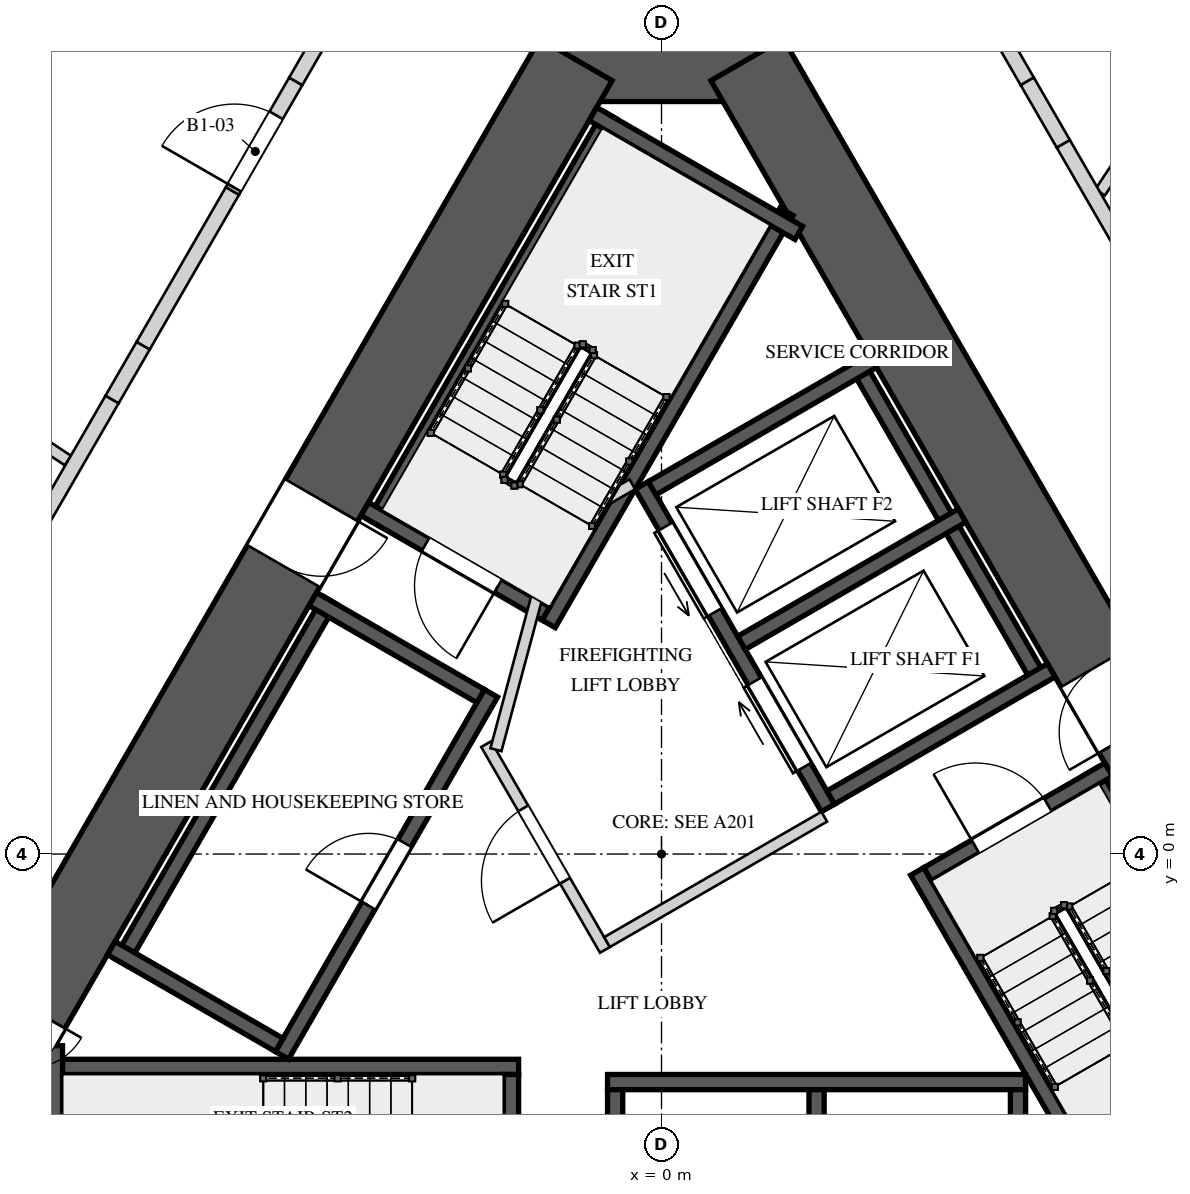
"""IFC4 building model, lengths in metres.
Left out: names, types, materials, properties, quantities, classifications, styles, units other than length and angle.
Written with IfcOpenShell. Run it as: python <this file> out.ifc"""

import sys

from ifc_helpers import new_model, si_unit, direction, frame, frame_2d, origin, place, context, subcontext, project, spatial, polyline, rectangle, outline, extrude, element, fill, save


model = new_model("IFC4")
c1 = context("Model", 3, precision=1e-05, world=origin(), true_north=direction((0.0, 1.0)))
c2 = subcontext(c1, "Body", "Model", "MODEL_VIEW")
j1 = project(units=[si_unit("LENGTHUNIT", "METRE"), si_unit("PLANEANGLEUNIT", "RADIAN")], contexts=[c1])
p1 = place(None, origin())
s1 = spatial("IfcSite", under=j1, at=p1, CompositionType="ELEMENT")
p2 = place(p1, origin())
s2 = spatial("IfcBuilding", under=s1, at=p2, CompositionType="ELEMENT")
p3 = place(p2, frame((0.0, 0.0, -5.0)))
s3 = spatial("IfcBuildingStorey", under=s2, at=p3, CompositionType="ELEMENT", Elevation=-5.0)
for number, where, z_axis, x_axis in (
    (1, (-2.454, 33.25, -0.3), (0.0, 0.0, 1.0), (-0.5, -0.866, 0.0)),
    (2, (30.022, -14.5, -0.3), (0.0, 0.0, 1.0), (-0.5, 0.866, 0.0)),
):
    element("IfcWall", number, at=place(p3, frame(where, z_axis=z_axis, x_axis=x_axis)), inside=s3, PredefinedType="SHEAR", context=c2, shape_type="SweptSolid", body=[
        extrude(rectangle(XDim=55.137, YDim=0.5, at=frame_2d((27.568, 0.0))), origin(), (0.0, 0.0, 1.0), 5.3),
    ])
p4 = place(p3, frame((1.443, 10.45, -0.3), z_axis=(0.0, 0.0, 1.0), x_axis=(-1.0, 0.0, 0.0)))
e3 = element("IfcWall", 3, at=p4, inside=s3, PredefinedType="SHEAR", context=c2, shape_type="SweptSolid", body=[
    extrude(rectangle(XDim=2.887, YDim=1.1, at=frame_2d((1.443, 0.0))), origin(), (0.0, 0.0, 1.0), 5.3),
])
p5 = place(p3, frame((-1.126, 10.45, -0.3), z_axis=(0.0, 0.0, 1.0), x_axis=(-0.500001757713, -0.866024388966, 0.0)))
e4 = element("IfcWall", 4, at=p5, inside=s3, PredefinedType="SHEAR", context=c2, shape_type="SweptSolid", body=[
    extrude(rectangle(XDim=16.974, YDim=1.1, at=frame_2d((8.487, 0.0))), origin(), (0.0, 0.0, 1.0), 5.3),
])
p6 = place(p5, frame((6.692, 0.0, 0.3)))
e5 = element("IfcOpeningElement", 5, at=p6, cuts=e4, PredefinedType="OPENING", context=c2, shape_type="SweptSolid", body=[
    extrude(rectangle(XDim=1.0, YDim=2.4, at=frame_2d((0.5, 1.2))), frame((0.0, 0.56, 0.0), z_axis=(0.0, -1.0, 0.0), x_axis=(1.0, 0.0, 0.0)), (0.0, 0.0, 1.0), 1.12),
])
p7 = place(p5, frame((14.397, 0.0, 0.3)))
e6 = element("IfcOpeningElement", 6, at=p7, cuts=e4, PredefinedType="OPENING", context=c2, shape_type="SweptSolid", body=[
    extrude(rectangle(XDim=0.8, YDim=2.1, at=frame_2d((0.4, 1.05))), frame((0.0, 0.56, 0.0), z_axis=(0.0, -1.0, 0.0), x_axis=(1.0, 0.0, 0.0)), (0.0, 0.0, 1.0), 1.12),
])
p8 = place(p3, frame((9.613, -4.25, -0.3), z_axis=(0.0, 0.0, 1.0), x_axis=(-0.500001757713, 0.866024388966, 0.0)))
e7 = element("IfcWall", 7, at=p8, inside=s3, PredefinedType="SHEAR", context=c2, shape_type="SweptSolid", body=[
    extrude(rectangle(XDim=16.974, YDim=1.1, at=frame_2d((8.487, 0.0))), origin(), (0.0, 0.0, 1.0), 5.3),
])
p9 = place(p8, frame((6.762, 0.0, 0.3)))
e8 = element("IfcOpeningElement", 8, at=p9, cuts=e7, PredefinedType="OPENING", context=c2, shape_type="SweptSolid", body=[
    extrude(rectangle(XDim=1.0, YDim=2.4, at=frame_2d((0.5, 1.2))), frame((0.0, 0.56, 0.0), z_axis=(0.0, -1.0, 0.0), x_axis=(1.0, 0.0, 0.0)), (0.0, 0.0, 1.0), 1.12),
])
p10 = place(p3, frame((-0.68, 9.722, 0.0), z_axis=(0.0, 0.0, 1.0), x_axis=(-0.49998037582, -0.866036733513, 0.0)))
e9 = element("IfcWall", 9, at=p10, inside=s3, PredefinedType="SOLIDWALL", context=c2, shape_type="SweptSolid", body=[
    extrude(rectangle(XDim=6.2, YDim=0.2, at=frame_2d((3.1, 0.0))), origin(), (0.0, 0.0, 1.0), 4.65),
])
p11 = place(p3, frame((1.646, 8.45, 0.0), z_axis=(0.0, 0.0, 1.0), x_axis=(-0.500006002103, -0.866021938441, 0.0)))
e10 = element("IfcWall", 10, at=p11, inside=s3, PredefinedType="SOLIDWALL", context=c2, shape_type="SweptSolid", body=[
    extrude(rectangle(XDim=6.261, YDim=0.2, at=frame_2d((3.13, 0.0))), origin(), (0.0, 0.0, 1.0), 4.65),
])
p12 = place(p3, frame((1.806, 8.172, 0.0), z_axis=(0.0, 0.0, 1.0), x_axis=(-0.866054327916, 0.499949898588, 0.0)))
e11 = element("IfcWall", 11, at=p12, inside=s3, PredefinedType="SOLIDWALL", context=c2, shape_type="SweptSolid", body=[
    extrude(rectangle(XDim=3.128, YDim=0.2, at=frame_2d((1.564, 0.0))), origin(), (0.0, 0.0, 1.0), 4.65),
])
p13 = place(p3, frame((-1.521, 3.165, 0.0), z_axis=(0.0, 0.0, 1.0), x_axis=(-0.866027397988, 0.499996545922, 0.0)))
e12 = element("IfcWall", 12, at=p13, inside=s3, PredefinedType="SOLIDWALL", context=c2, shape_type="SweptSolid", body=[
    extrude(rectangle(XDim=2.75, YDim=0.2, at=frame_2d((1.375, 0.0))), origin(), (0.0, 0.0, 1.0), 4.65),
])
p14 = place(p13, frame((0.725, 0.0, 0.0)))
e13 = element("IfcOpeningElement", 13, at=p14, cuts=e12, PredefinedType="OPENING", context=c2, shape_type="SweptSolid", body=[
    extrude(rectangle(XDim=1.1, YDim=2.4, at=frame_2d((0.55, 1.2))), frame((0.0, 0.11, 0.0), z_axis=(0.0, -1.0, 0.0), x_axis=(1.0, 0.0, 0.0)), (0.0, 0.0, 1.0), 0.22),
])
p15 = place(p3, frame((-8.141, -2.8, 0.0), z_axis=(0.0, 0.0, 1.0), x_axis=(1.0, 0.0, 0.0)))
e14 = element("IfcWall", 14, at=p15, inside=s3, PredefinedType="SOLIDWALL", context=c2, shape_type="SweptSolid", body=[
    extrude(rectangle(XDim=6.261, YDim=0.2, at=frame_2d((3.13, 0.0))), origin(), (0.0, 0.0, 1.0), 4.65),
])
p16 = place(p3, frame((-7.98, -2.522, 0.0), z_axis=(0.0, 0.0, 1.0), x_axis=(0.0, -1.0, 0.0)))
e15 = element("IfcWall", 15, at=p16, inside=s3, PredefinedType="SOLIDWALL", context=c2, shape_type="SweptSolid", body=[
    extrude(rectangle(XDim=3.128, YDim=0.2, at=frame_2d((1.564, 0.0))), origin(), (0.0, 0.0, 1.0), 4.65),
])
p17 = place(p3, frame((-1.98, -2.9, 0.0), z_axis=(0.0, 0.0, 1.0), x_axis=(0.0, -1.0, 0.0)))
e16 = element("IfcWall", 16, at=p17, inside=s3, PredefinedType="SOLIDWALL", context=c2, shape_type="SweptSolid", body=[
    extrude(rectangle(XDim=2.75, YDim=0.2, at=frame_2d((1.375, 0.0))), origin(), (0.0, 0.0, 1.0), 4.65),
])
p18 = place(p17, frame((0.725, 0.0, 0.0)))
e17 = element("IfcOpeningElement", 17, at=p18, cuts=e16, PredefinedType="OPENING", context=c2, shape_type="SweptSolid", body=[
    extrude(rectangle(XDim=1.1, YDim=2.4, at=frame_2d((0.55, 1.2))), frame((0.0, 0.11, 0.0), z_axis=(0.0, -1.0, 0.0), x_axis=(1.0, 0.0, 0.0)), (0.0, 0.0, 1.0), 0.22),
])
p19 = place(p3, frame((8.76, -4.272, 0.0), z_axis=(0.0, 0.0, 1.0), x_axis=(-0.49998037582, 0.866036733513, 0.0)))
e18 = element("IfcWall", 18, at=p19, inside=s3, PredefinedType="SOLIDWALL", context=c2, shape_type="SweptSolid", body=[
    extrude(rectangle(XDim=6.2, YDim=0.2, at=frame_2d((3.1, 0.0))), origin(), (0.0, 0.0, 1.0), 4.65),
])
p20 = place(p3, frame((6.495, -5.65, 0.0), z_axis=(0.0, 0.0, 1.0), x_axis=(-0.499976754523, 0.866038824151, 0.0)))
e19 = element("IfcWall", 19, at=p20, inside=s3, PredefinedType="SOLIDWALL", context=c2, shape_type="SweptSolid", body=[
    extrude(rectangle(XDim=6.26, YDim=0.2, at=frame_2d((3.13, 0.0))), origin(), (0.0, 0.0, 1.0), 4.65),
])
p21 = place(p3, frame((3.501, -0.265, 0.0), z_axis=(0.0, 0.0, 1.0), x_axis=(0.866027397988, 0.499996545922, 0.0)))
e20 = element("IfcWall", 20, at=p21, inside=s3, PredefinedType="SOLIDWALL", context=c2, shape_type="SweptSolid", body=[
    extrude(rectangle(XDim=2.75, YDim=0.2, at=frame_2d((1.375, 0.0))), origin(), (0.0, 0.0, 1.0), 4.65),
])
p22 = place(p21, frame((0.725, 0.0, 0.0)))
e21 = element("IfcOpeningElement", 21, at=p22, cuts=e20, PredefinedType="OPENING", context=c2, shape_type="SweptSolid", body=[
    extrude(rectangle(XDim=1.1, YDim=2.4, at=frame_2d((0.55, 1.2))), frame((0.0, 0.11, 0.0), z_axis=(0.0, -1.0, 0.0), x_axis=(1.0, 0.0, 0.0)), (0.0, 0.0, 1.0), 0.22),
])
p23 = place(p3, frame((-4.993, -2.648, 0.0), z_axis=(0.0, 0.0, 1.0), x_axis=(0.499996545922, 0.866027397988, 0.0)))
e22 = element("IfcWall", 22, at=p23, inside=s3, PredefinedType="SOLIDWALL", context=c2, shape_type="SweptSolid", body=[
    extrude(rectangle(XDim=5.5, YDim=0.2, at=frame_2d((2.75, 0.0))), origin(), (0.0, 0.0, 1.0), 4.65),
])
p24 = place(p23, frame((2.275, 0.0, 0.0)))
e23 = element("IfcOpeningElement", 23, at=p24, cuts=e22, PredefinedType="OPENING", context=c2, shape_type="SweptSolid", body=[
    extrude(rectangle(XDim=0.95, YDim=2.4, at=frame_2d((0.475, 1.2))), frame((0.0, 0.11, 0.0), z_axis=(0.0, -1.0, 0.0), x_axis=(1.0, 0.0, 0.0)), (0.0, 0.0, 1.0), 0.22),
])
p25 = place(p3, frame((-4.365, 3.34, 0.0), z_axis=(0.0, 0.0, 1.0), x_axis=(-0.499996545922, -0.866027397988, 0.0)))
e24 = element("IfcWall", 24, at=p25, inside=s3, PredefinedType="SOLIDWALL", context=c2, shape_type="SweptSolid", body=[
    extrude(rectangle(XDim=5.5, YDim=0.2, at=frame_2d((2.75, 0.0))), origin(), (0.0, 0.0, 1.0), 4.65),
])
for number, where, z_axis, x_axis in (
    (25, (-2.38, 2.078, 0.0), (0.0, 0.0, 1.0), (-0.866, 0.5, 0.0)),
    (26, (-5.03, -2.512, 0.0), (0.0, 0.0, 1.0), (-0.866, 0.5, 0.0)),
):
    element("IfcWall", number, at=place(p3, frame(where, z_axis=z_axis, x_axis=x_axis)), inside=s3, PredefinedType="SOLIDWALL", context=c2, shape_type="SweptSolid", body=[
        extrude(rectangle(XDim=2.55, YDim=0.2, at=frame_2d((1.275, 0.0))), origin(), (0.0, 0.0, 1.0), 4.65),
    ])
p26 = place(p3, frame((-0.71, -3.0, 0.0), z_axis=(0.0, 0.0, 1.0), x_axis=(1.0, 0.0, 0.0)))
e27 = element("IfcWall", 27, at=p26, inside=s3, PredefinedType="SOLIDWALL", context=c2, shape_type="SweptSolid", body=[
    extrude(rectangle(XDim=5.5, YDim=0.2, at=frame_2d((2.75, 0.0))), origin(), (0.0, 0.0, 1.0), 4.65),
])
for number, where, z_axis, x_axis in (
    (28, (-0.61, -3.1, 0.0), (0.0, 0.0, 1.0), (0.0, -1.0, 0.0)),
    (29, (2.04, -3.1, 0.0), (0.0, 0.0, 1.0), (0.0, -1.0, 0.0)),
    (30, (4.69, -3.1, 0.0), (0.0, 0.0, 1.0), (0.0, -1.0, 0.0)),
):
    element("IfcWall", number, at=place(p3, frame(where, z_axis=z_axis, x_axis=x_axis)), inside=s3, PredefinedType="SOLIDWALL", context=c2, shape_type="SweptSolid", body=[
        extrude(rectangle(XDim=2.55, YDim=0.2, at=frame_2d((1.275, 0.0))), origin(), (0.0, 0.0, 1.0), 4.65),
    ])
p27 = place(p3, frame((2.19, 0.606, 0.0), z_axis=(0.0, 0.0, 1.0), x_axis=(-0.500002801628, 0.866023786258, 0.0)))
e31 = element("IfcWall", 31, at=p27, inside=s3, PredefinedType="SOLIDWALL", context=c2, shape_type="SweptSolid", body=[
    extrude(rectangle(XDim=4.9, YDim=0.2, at=frame_2d((2.45, 0.0))), origin(), (0.0, 0.0, 1.0), 4.65),
])
p28 = place(p27, frame((0.625, 0.0, 0.0)))
e32 = element("IfcOpeningElement", 32, at=p28, cuts=e31, PredefinedType="OPENING", context=c2, shape_type="SweptSolid", body=[
    extrude(rectangle(XDim=1.3, YDim=2.1, at=frame_2d((0.65, 1.05))), frame((0.0, 0.11, 0.0), z_axis=(0.0, -1.0, 0.0), x_axis=(1.0, 0.0, 0.0)), (0.0, 0.0, 1.0), 0.22),
])
p29 = place(p27, frame((2.975, 0.0, 0.0)))
e33 = element("IfcOpeningElement", 33, at=p29, cuts=e31, PredefinedType="OPENING", context=c2, shape_type="SweptSolid", body=[
    extrude(rectangle(XDim=1.3, YDim=2.1, at=frame_2d((0.65, 1.05))), frame((0.0, 0.11, 0.0), z_axis=(0.0, -1.0, 0.0), x_axis=(1.0, 0.0, 0.0)), (0.0, 0.0, 1.0), 0.22),
])
p30 = place(p3, frame((5.005, 2.231, 0.0), z_axis=(0.0, 0.0, 1.0), x_axis=(-0.500002801628, 0.866023786258, 0.0)))
e34 = element("IfcWall", 34, at=p30, inside=s3, PredefinedType="SOLIDWALL", context=c2, shape_type="SweptSolid", body=[
    extrude(rectangle(XDim=4.9, YDim=0.2, at=frame_2d((2.45, 0.0))), origin(), (0.0, 0.0, 1.0), 4.65),
])
p31 = place(p3, frame((2.227, 0.743, 0.0), z_axis=(0.0, 0.0, 1.0), x_axis=(0.866014461049, 0.500018952895, 0.0)))
e35 = element("IfcWall", 35, at=p31, inside=s3, PredefinedType="SOLIDWALL", context=c2, shape_type="SweptSolid", body=[
    extrude(rectangle(XDim=3.35, YDim=0.2, at=frame_2d((1.675, 0.0))), origin(), (0.0, 0.0, 1.0), 4.65),
])
p32 = place(p3, frame((1.052, 2.778, 0.0), z_axis=(0.0, 0.0, 1.0), x_axis=(0.866032680314, 0.499987396469, 0.0)))
e36 = element("IfcWall", 36, at=p32, inside=s3, PredefinedType="SOLIDWALL", context=c2, shape_type="SweptSolid", body=[
    extrude(rectangle(XDim=3.35, YDim=0.2, at=frame_2d((1.675, 0.0))), origin(), (0.0, 0.0, 1.0), 4.65),
])
p33 = place(p3, frame((-0.123, 4.813, 0.0), z_axis=(0.0, 0.0, 1.0), x_axis=(0.866014461049, 0.500018952895, 0.0)))
e37 = element("IfcWall", 37, at=p33, inside=s3, PredefinedType="SOLIDWALL", context=c2, shape_type="SweptSolid", body=[
    extrude(rectangle(XDim=3.35, YDim=0.2, at=frame_2d((1.675, 0.0))), origin(), (0.0, 0.0, 1.0), 4.65),
])
p34 = place(p3, frame((-0.744, -1.261, 0.0), z_axis=(0.0, 0.0, 1.0), x_axis=(-0.500004234368, 0.866022959057, 0.0)))
e38 = element("IfcWall", 38, at=p34, inside=s3, PredefinedType="PARTITIONING", context=c2, shape_type="SweptSolid", body=[
    extrude(rectangle(XDim=3.125, YDim=0.15, at=frame_2d((1.562, 0.0))), origin(), (0.0, 0.0, 1.0), 4.65),
])
p35 = place(p34, frame((1.05, 0.0, 0.0)))
e39 = element("IfcOpeningElement", 39, at=p35, cuts=e38, PredefinedType="OPENING", context=c2, shape_type="SweptSolid", body=[
    extrude(rectangle(XDim=1.1, YDim=2.4, at=frame_2d((0.55, 1.2))), frame((0.0, 0.085, 0.0), z_axis=(0.0, -1.0, 0.0), x_axis=(1.0, 0.0, 0.0)), (0.0, 0.0, 1.0), 0.17),
])
p36 = place(p3, frame((-0.717, -1.159, 0.0), z_axis=(0.0, 0.0, 1.0), x_axis=(0.866008176907, 0.50002983664, 0.0)))
e40 = element("IfcWall", 40, at=p36, inside=s3, PredefinedType="PARTITIONING", context=c2, shape_type="SweptSolid", body=[
    extrude(rectangle(XDim=3.3, YDim=0.15, at=frame_2d((1.65, 0.0))), origin(), (0.0, 0.0, 1.0), 4.65),
])
p37 = place(p3, frame((-2.178, 1.372, 0.0), z_axis=(0.0, 0.0, 1.0), x_axis=(0.258808958833, 0.96592852884, 0.0)))
e41 = element("IfcWall", 41, at=p37, inside=s3, PredefinedType="PARTITIONING", context=c2, shape_type="SweptSolid", body=[
    extrude(rectangle(XDim=2.903, YDim=0.15, at=frame_2d((1.451, 0.0))), origin(), (0.0, 0.0, 1.0), 4.65),
])
p38 = place(p3, frame((-1.51, 4.215, 0.0), z_axis=(0.0, 0.0, 1.0), x_axis=(0.866085525409, 0.49989585183, 0.0)))
e42 = element("IfcWall", 42, at=p38, inside=s3, PredefinedType="PARTITIONING", context=c2, shape_type="SweptSolid", body=[
    extrude(rectangle(XDim=1.3, YDim=0.15, at=frame_2d((0.65, 0.0))), origin(), (0.0, 0.0, 1.0), 4.65),
])
p39 = place(p3, frame((-7.808, 5.176, 0.0), z_axis=(0.0, 0.0, 1.0), x_axis=(-0.833484918625, 0.552542206917, 0.0)))
e43 = element("IfcWall", 43, at=p39, inside=s3, PredefinedType="PARTITIONING", context=c2, shape_type="SweptSolid", body=[
    extrude(rectangle(XDim=9.067, YDim=0.15, at=frame_2d((4.534, 0.0))), origin(), (0.0, 0.0, 1.0), 4.65),
])
p40 = place(p3, frame((5.771, 8.705, 0.0), z_axis=(0.0, 0.0, 1.0), x_axis=(0.552519064747, 0.833500259802, 0.0)))
e44 = element("IfcWall", 44, at=p40, inside=s3, PredefinedType="PARTITIONING", context=c2, shape_type="SweptSolid", body=[
    extrude(rectangle(XDim=10.109, YDim=0.15, at=frame_2d((5.054, 0.0))), origin(), (0.0, 0.0, 1.0), 4.65),
])
p41 = place(p3, frame((3.404, 12.604, 0.0), z_axis=(0.0, 0.0, 1.0), x_axis=(0.500000186108, -0.866025296335, 0.0)))
e45 = element("IfcWall", 45, at=p41, inside=s3, PredefinedType="SOLIDWALL", context=c2, shape_type="SweptSolid", body=[
    extrude(rectangle(XDim=2.815, YDim=0.2, at=frame_2d((1.408, 0.0))), origin(), (0.0, 0.0, 1.0), 4.65),
])
p42 = place(p3, frame((4.812, 10.165, 0.0), z_axis=(0.0, 0.0, 1.0), x_axis=(0.500174821557, -0.865924446982, 0.0)))
e46 = element("IfcWall", 46, at=p42, inside=s3, PredefinedType="SOLIDWALL", context=c2, shape_type="SweptSolid", body=[
    extrude(rectangle(XDim=0.95, YDim=0.2, at=frame_2d((0.475, 0.0))), origin(), (0.0, 0.0, 1.0), 3.75),
])
p43 = place(p3, frame((5.287, 9.343, 0.0), z_axis=(0.0, 0.0, 1.0), x_axis=(0.499952348839, -0.866052913447, 0.0)))
e47 = element("IfcWall", 47, at=p43, inside=s3, PredefinedType="SOLIDWALL", context=c2, shape_type="SweptSolid", body=[
    extrude(rectangle(XDim=3.064, YDim=0.2, at=frame_2d((1.532, 0.0))), origin(), (0.0, 0.0, 1.0), 4.65),
])
p44 = place(p3, frame((-8.793, 3.27, 0.0), z_axis=(0.0, 0.0, 1.0), x_axis=(0.499947505232, 0.866055709532, 0.0)))
e48 = element("IfcWall", 48, at=p44, inside=s3, PredefinedType="SOLIDWALL", context=c2, shape_type="SweptSolid", body=[
    extrude(rectangle(XDim=3.13, YDim=0.2, at=frame_2d((1.565, 0.0))), origin(), (0.0, 0.0, 1.0), 4.65),
])
p45 = place(p3, frame((-7.228, 5.98, 0.0), z_axis=(0.0, 0.0, 1.0), x_axis=(0.500118501653, 0.865956976012, 0.0)))
e49 = element("IfcWall", 49, at=p45, inside=s3, PredefinedType="SOLIDWALL", context=c2, shape_type="SweptSolid", body=[
    extrude(rectangle(XDim=0.818, YDim=0.2, at=frame_2d((0.409, 0.0))), origin(), (0.0, 0.0, 1.0), 3.75),
])
p46 = place(p3, frame((-6.819, 6.689, 0.0), z_axis=(0.0, 0.0, 1.0), x_axis=(0.499995339376, 0.86602809458, 0.0)))
e50 = element("IfcWall", 50, at=p46, inside=s3, PredefinedType="SOLIDWALL", context=c2, shape_type="SweptSolid", body=[
    extrude(rectangle(XDim=2.349, YDim=0.2, at=frame_2d((1.175, 0.0))), origin(), (0.0, 0.0, 1.0), 4.65),
])
p47 = place(p3, frame((-5.645, 8.723, 0.0), z_axis=(0.0, 0.0, 1.0), x_axis=(0.500018619731, 0.866014653411, 0.0)))
e51 = element("IfcWall", 51, at=p47, inside=s3, PredefinedType="SOLIDWALL", context=c2, shape_type="SweptSolid", body=[
    extrude(outline(polyline([(0.0, 0.0), (1.665, 0.0), (1.665, 3.75), (0.715, 3.75), (0.715, 4.65), (0.0, 4.65), (0.0, 0.0)])), frame((0.0, 0.1, 0.0), z_axis=(0.0, -1.0, 0.0), x_axis=(1.0, 0.0, 0.0)), (0.0, 0.0, 1.0), 0.2),
])
p48 = place(p47, frame((0.05, 0.0, 0.0)))
e52 = element("IfcOpeningElement", 52, at=p48, cuts=e51, PredefinedType="OPENING", context=c2, shape_type="SweptSolid", body=[
    extrude(rectangle(XDim=1.1, YDim=2.4, at=frame_2d((0.55, 1.2))), frame((0.0, 0.11, 0.0), z_axis=(0.0, -1.0, 0.0), x_axis=(1.0, 0.0, 0.0)), (0.0, 0.0, 1.0), 0.22),
])
p49 = place(p3, frame((-4.812, 10.165, 0.0), z_axis=(0.0, 0.0, 1.0), x_axis=(0.500000186108, 0.866025296335, 0.0)))
e53 = element("IfcWall", 53, at=p49, inside=s3, PredefinedType="SOLIDWALL", context=c2, shape_type="SweptSolid", body=[
    extrude(rectangle(XDim=2.815, YDim=0.2, at=frame_2d((1.408, 0.0))), origin(), (0.0, 0.0, 1.0), 4.65),
])
p50 = place(p14, origin())
e54 = element("IfcDoor", 54, at=p50, inside=s3, OperationType="SINGLE_SWING_RIGHT", PredefinedType="DOOR", context=c2, shape_type="SweptSolid", body=[
    extrude(rectangle(XDim=1.1, YDim=2.4, at=frame_2d((0.55, 1.2))), frame((0.0, 0.025, 0.0), z_axis=(0.0, -1.0, 0.0), x_axis=(1.0, 0.0, 0.0)), (0.0, 0.0, 1.0), 0.05),
])
fill(e13, e54)
p51 = place(p22, origin())
e55 = element("IfcDoor", 55, at=p51, inside=s3, OperationType="SINGLE_SWING_RIGHT", PredefinedType="DOOR", context=c2, shape_type="SweptSolid", body=[
    extrude(rectangle(XDim=1.1, YDim=2.4, at=frame_2d((0.55, 1.2))), frame((0.0, 0.025, 0.0), z_axis=(0.0, -1.0, 0.0), x_axis=(1.0, 0.0, 0.0)), (0.0, 0.0, 1.0), 0.05),
])
fill(e21, e55)
p52 = place(p24, origin())
e56 = element("IfcDoor", 56, at=p52, inside=s3, OperationType="SINGLE_SWING_LEFT", PredefinedType="DOOR", context=c2, shape_type="SweptSolid", body=[
    extrude(rectangle(XDim=0.95, YDim=2.4, at=frame_2d((0.475, 1.2))), frame((0.0, 0.025, 0.0), z_axis=(0.0, -1.0, 0.0), x_axis=(1.0, 0.0, 0.0)), (0.0, 0.0, 1.0), 0.05),
])
fill(e23, e56)
p53 = place(p28, origin())
e57 = element("IfcDoor", 57, at=p53, inside=s3, OperationType="SLIDING_TO_RIGHT", PredefinedType="DOOR", context=c2, shape_type="SweptSolid", body=[
    extrude(rectangle(XDim=1.3, YDim=2.1, at=frame_2d((0.65, 1.05))), frame((0.0, 0.025, 0.0), z_axis=(0.0, -1.0, 0.0), x_axis=(1.0, 0.0, 0.0)), (0.0, 0.0, 1.0), 0.05),
])
fill(e32, e57)
p54 = place(p29, origin())
e58 = element("IfcDoor", 58, at=p54, inside=s3, OperationType="SLIDING_TO_LEFT", PredefinedType="DOOR", context=c2, shape_type="SweptSolid", body=[
    extrude(rectangle(XDim=1.3, YDim=2.1, at=frame_2d((0.65, 1.05))), frame((0.0, 0.025, 0.0), z_axis=(0.0, -1.0, 0.0), x_axis=(1.0, 0.0, 0.0)), (0.0, 0.0, 1.0), 0.05),
])
fill(e33, e58)
p55 = place(p35, origin())
e59 = element("IfcDoor", 59, at=p55, inside=s3, OperationType="SINGLE_SWING_RIGHT", PredefinedType="DOOR", context=c2, shape_type="SweptSolid", body=[
    extrude(rectangle(XDim=1.1, YDim=2.4, at=frame_2d((0.55, 1.2))), frame((0.0, 0.025, 0.0), z_axis=(0.0, -1.0, 0.0), x_axis=(1.0, 0.0, 0.0)), (0.0, 0.0, 1.0), 0.05),
])
fill(e39, e59)
p56 = place(p6, origin())
e60 = element("IfcDoor", 60, at=p56, inside=s3, OperationType="SINGLE_SWING_LEFT", PredefinedType="DOOR", context=c2, shape_type="SweptSolid", body=[
    extrude(rectangle(XDim=1.0, YDim=2.4, at=frame_2d((0.5, 1.2))), frame((0.0, 0.025, 0.0), z_axis=(0.0, -1.0, 0.0), x_axis=(1.0, 0.0, 0.0)), (0.0, 0.0, 1.0), 0.05),
])
fill(e5, e60)
p57 = place(p9, origin())
e61 = element("IfcDoor", 61, at=p57, inside=s3, OperationType="SINGLE_SWING_LEFT", PredefinedType="DOOR", context=c2, shape_type="SweptSolid", body=[
    extrude(rectangle(XDim=1.0, YDim=2.4, at=frame_2d((0.5, 1.2))), frame((0.0, 0.025, 0.0), z_axis=(0.0, -1.0, 0.0), x_axis=(1.0, 0.0, 0.0)), (0.0, 0.0, 1.0), 0.05),
])
fill(e8, e61)
p58 = place(p48, origin())
e62 = element("IfcDoor", 62, at=p58, inside=s3, OperationType="SINGLE_SWING_LEFT", PredefinedType="DOOR", context=c2, shape_type="SweptSolid", body=[
    extrude(rectangle(XDim=1.1, YDim=2.4, at=frame_2d((0.55, 1.2))), frame((0.0, 0.025, 0.0), z_axis=(0.0, -1.0, 0.0), x_axis=(1.0, 0.0, 0.0)), (0.0, 0.0, 1.0), 0.05),
])
fill(e52, e62)
save(model, sys.argv[1])
